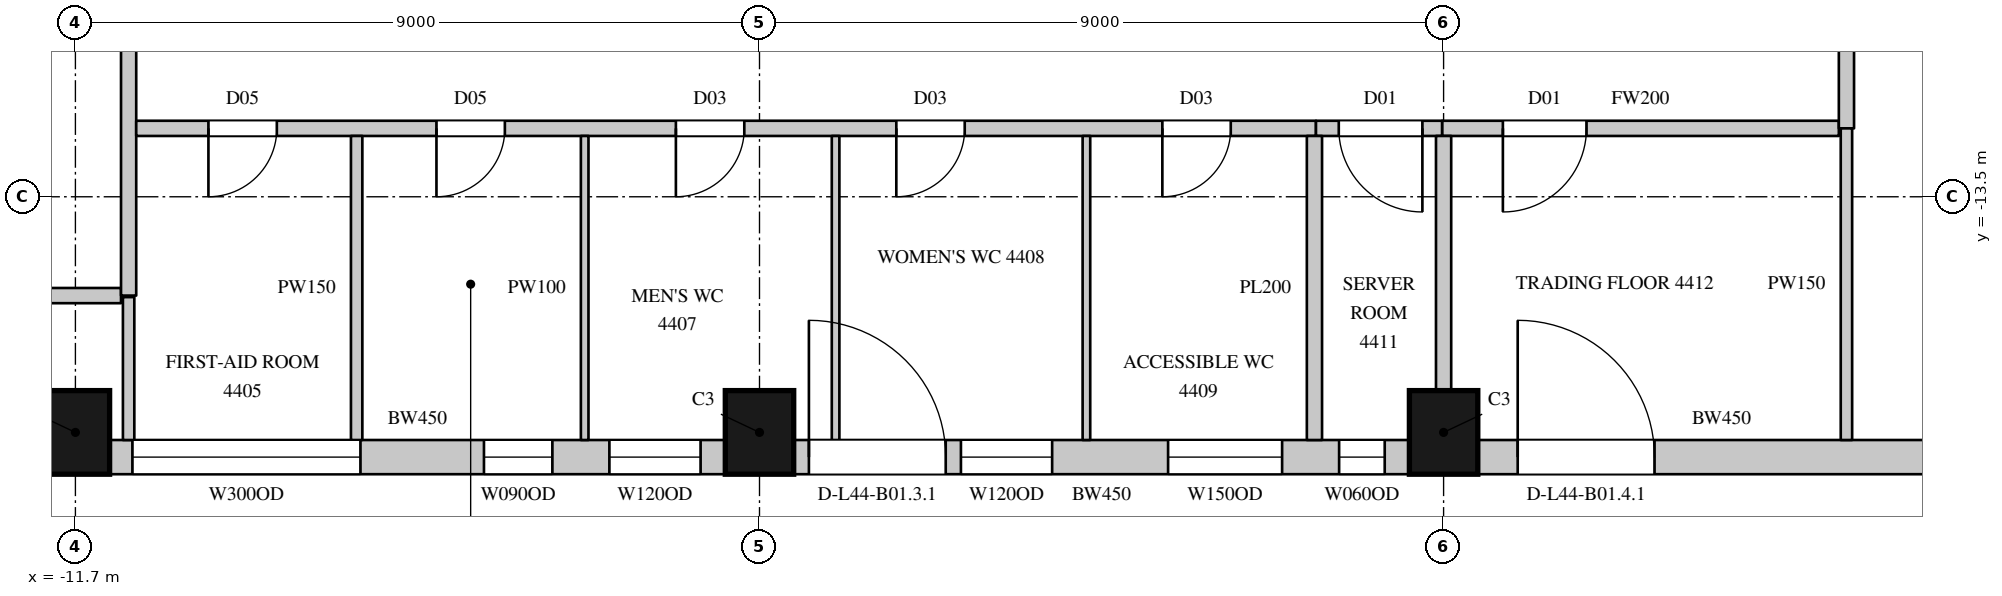
"""IFC4 building model, lengths in metres.
Left out: names, types, materials, properties, quantities, classifications, styles, units other than length and angle.
Written with IfcOpenShell. Run it as: python <this file> out.ifc"""

import sys

from ifc_helpers import new_model, si_unit, direction, frame, frame_2d, origin, origin_2d, place, context, subcontext, project, spatial, rectangle, extrude, element, fill, save


model = new_model("IFC4")
c1 = context("Model", 3, precision=1e-05, world=origin(), true_north=direction((0.0, 1.0)))
c2 = subcontext(c1, "Body", "Model", "MODEL_VIEW")
j1 = project(units=[si_unit("LENGTHUNIT", "METRE"), si_unit("PLANEANGLEUNIT", "RADIAN")], contexts=[c1])
p1 = place(None, origin())
s1 = spatial("IfcSite", under=j1, at=p1, CompositionType="ELEMENT")
p2 = place(p1, origin())
s2 = spatial("IfcBuilding", under=s1, at=p2, CompositionType="ELEMENT")
p3 = place(p2, frame((0.0, 0.0, 201.5)))
s3 = spatial("IfcBuildingStorey", under=s2, at=p3, CompositionType="ELEMENT", Elevation=201.5)
for number, where, z_axis, x_axis in (
    (1, (-11.7, -16.6, 0.0), (0.0, 0.0, 1.0), (1.0, 0.0, 0.0)),
    (2, (-2.7, -16.6, 0.0), (0.0, 0.0, 1.0), (1.0, 0.0, 0.0)),
    (3, (6.3, -16.6, 0.0), (0.0, 0.0, 1.0), (1.0, 0.0, 0.0)),
):
    element("IfcColumn", number, at=place(p3, frame(where, z_axis=z_axis, x_axis=x_axis)), inside=s3, PredefinedType="COLUMN", context=c2, shape_type="SweptSolid", body=[
        extrude(rectangle(XDim=0.9, YDim=1.1, at=origin_2d()), origin(), (0.0, 0.0, 1.0), 4.1),
    ])
p4 = place(p3, frame((-11.25, -16.925, 0.0), z_axis=(0.0, 0.0, 1.0), x_axis=(1.0, 0.0, 0.0)))
e4 = element("IfcWall", 4, at=p4, inside=s3, PredefinedType="SOLIDWALL", context=c2, shape_type="SweptSolid", body=[
    extrude(rectangle(XDim=8.1, YDim=0.45, at=frame_2d((4.05, 0.0))), origin(), (0.0, 0.0, 1.0), 3.8),
])
p5 = place(p4, frame((0.3, 0.0, 1.05)))
e5 = element("IfcOpeningElement", 5, at=p5, cuts=e4, PredefinedType="OPENING", context=c2, shape_type="SweptSolid", body=[
    extrude(rectangle(XDim=3.0, YDim=2.4, at=frame_2d((1.5, 1.2))), frame((0.0, 0.235, 0.0), z_axis=(0.0, -1.0, 0.0), x_axis=(1.0, 0.0, 0.0)), (0.0, 0.0, 1.0), 0.47),
])
p6 = place(p4, frame((4.925, 0.0, 1.05)))
e6 = element("IfcOpeningElement", 6, at=p6, cuts=e4, PredefinedType="OPENING", context=c2, shape_type="SweptSolid", body=[
    extrude(rectangle(XDim=0.9, YDim=2.4, at=frame_2d((0.45, 1.2))), frame((0.0, 0.235, 0.0), z_axis=(0.0, -1.0, 0.0), x_axis=(1.0, 0.0, 0.0)), (0.0, 0.0, 1.0), 0.47),
])
p7 = place(p4, frame((6.575, 0.0, 1.05)))
e7 = element("IfcOpeningElement", 7, at=p7, cuts=e4, PredefinedType="OPENING", context=c2, shape_type="SweptSolid", body=[
    extrude(rectangle(XDim=1.2, YDim=2.4, at=frame_2d((0.6, 1.2))), frame((0.0, 0.235, 0.0), z_axis=(0.0, -1.0, 0.0), x_axis=(1.0, 0.0, 0.0)), (0.0, 0.0, 1.0), 0.47),
])
p8 = place(p3, frame((-2.25, -16.925, 0.0), z_axis=(0.0, 0.0, 1.0), x_axis=(1.0, 0.0, 0.0)))
e8 = element("IfcWall", 8, at=p8, inside=s3, PredefinedType="SOLIDWALL", context=c2, shape_type="SweptSolid", body=[
    extrude(rectangle(XDim=8.1, YDim=0.45, at=frame_2d((4.05, 0.0))), origin(), (0.0, 0.0, 1.0), 3.8),
])
p9 = place(p8, frame((0.2, 0.0, 0.0)))
e9 = element("IfcOpeningElement", 9, at=p9, cuts=e8, PredefinedType="OPENING", context=c2, shape_type="SweptSolid", body=[
    extrude(rectangle(XDim=1.8, YDim=2.4, at=frame_2d((0.9, 1.2))), frame((0.0, 0.235, 0.0), z_axis=(0.0, -1.0, 0.0), x_axis=(1.0, 0.0, 0.0)), (0.0, 0.0, 1.0), 0.47),
])
p10 = place(p8, frame((2.2, 0.0, 1.05)))
e10 = element("IfcOpeningElement", 10, at=p10, cuts=e8, PredefinedType="OPENING", context=c2, shape_type="SweptSolid", body=[
    extrude(rectangle(XDim=1.2, YDim=2.4, at=frame_2d((0.6, 1.2))), frame((0.0, 0.235, 0.0), z_axis=(0.0, -1.0, 0.0), x_axis=(1.0, 0.0, 0.0)), (0.0, 0.0, 1.0), 0.47),
])
p11 = place(p8, frame((4.926, 0.0, 1.05)))
e11 = element("IfcOpeningElement", 11, at=p11, cuts=e8, PredefinedType="OPENING", context=c2, shape_type="SweptSolid", body=[
    extrude(rectangle(XDim=1.5, YDim=2.4, at=frame_2d((0.75, 1.2))), frame((0.0, 0.235, 0.0), z_axis=(0.0, -1.0, 0.0), x_axis=(1.0, 0.0, 0.0)), (0.0, 0.0, 1.0), 0.47),
])
p12 = place(p8, frame((7.176, 0.0, 1.05)))
e12 = element("IfcOpeningElement", 12, at=p12, cuts=e8, PredefinedType="OPENING", context=c2, shape_type="SweptSolid", body=[
    extrude(rectangle(XDim=0.6, YDim=2.4, at=frame_2d((0.3, 1.2))), frame((0.0, 0.235, 0.0), z_axis=(0.0, -1.0, 0.0), x_axis=(1.0, 0.0, 0.0)), (0.0, 0.0, 1.0), 0.47),
])
p13 = place(p3, frame((6.75, -16.925, 0.0), z_axis=(0.0, 0.0, 1.0), x_axis=(1.0, 0.0, 0.0)))
e13 = element("IfcWall", 13, at=p13, inside=s3, PredefinedType="SOLIDWALL", context=c2, shape_type="SweptSolid", body=[
    extrude(rectangle(XDim=6.414, YDim=0.45, at=frame_2d((3.207, 0.0))), origin(), (0.0, 0.0, 1.0), 3.8),
])
p14 = place(p13, frame((0.525, 0.0, 0.0)))
e14 = element("IfcOpeningElement", 14, at=p14, cuts=e13, PredefinedType="OPENING", context=c2, shape_type="SweptSolid", body=[
    extrude(rectangle(XDim=1.8, YDim=2.4, at=frame_2d((0.9, 1.2))), frame((0.0, 0.235, 0.0), z_axis=(0.0, -1.0, 0.0), x_axis=(1.0, 0.0, 0.0)), (0.0, 0.0, 1.0), 0.47),
])
p15 = place(p3, frame((-13.97, -14.8, 0.0), z_axis=(0.0, 0.0, 1.0), x_axis=(1.0, 0.0, 0.0)))
e15 = element("IfcWall", 15, at=p15, inside=s3, PredefinedType="PARTITIONING", context=c2, shape_type="SweptSolid", body=[
    extrude(rectangle(XDim=2.87, YDim=0.2, at=frame_2d((1.435, 0.0))), origin(), (0.0, 0.0, 1.0), 3.8),
])
p16 = place(p3, frame((-11.0, -14.8, 0.0), z_axis=(0.0, 0.0, 1.0), x_axis=(0.0, 1.0, 0.0)))
e16 = element("IfcWall", 16, at=p16, inside=s3, PredefinedType="PARTITIONING", context=c2, shape_type="SweptSolid", body=[
    extrude(rectangle(XDim=29.6, YDim=0.2, at=frame_2d((14.8, 0.0))), origin(), (0.0, 0.0, 1.0), 3.8),
])
p17 = place(p16, frame((14.05, 0.0, 0.0)))
e17 = element("IfcOpeningElement", 17, at=p17, cuts=e16, PredefinedType="OPENING", context=c2, shape_type="SweptSolid", body=[
    extrude(rectangle(XDim=1.5, YDim=2.4, at=frame_2d((0.75, 1.2))), frame((0.0, 0.11, 0.0), z_axis=(0.0, -1.0, 0.0), x_axis=(1.0, 0.0, 0.0)), (0.0, 0.0, 1.0), 0.22),
])
p18 = place(p3, frame((-10.9, -12.6, 0.0), z_axis=(0.0, 0.0, 1.0), x_axis=(1.0, 0.0, 0.0)))
e18 = element("IfcWall", 18, at=p18, inside=s3, PredefinedType="PARTITIONING", context=c2, shape_type="SweptSolid", body=[
    extrude(rectangle(XDim=15.521, YDim=0.2, at=frame_2d((7.76, 0.0))), origin(), (0.0, 0.0, 1.0), 3.8),
])
p19 = place(p18, frame((0.95, 0.0, 0.0)))
e19 = element("IfcOpeningElement", 19, at=p19, cuts=e18, PredefinedType="OPENING", context=c2, shape_type="SweptSolid", body=[
    extrude(rectangle(XDim=0.9, YDim=2.2, at=frame_2d((0.45, 1.1))), frame((0.0, 0.11, 0.0), z_axis=(0.0, -1.0, 0.0), x_axis=(1.0, 0.0, 0.0)), (0.0, 0.0, 1.0), 0.22),
])
p20 = place(p18, frame((3.95, 0.0, 0.0)))
e20 = element("IfcOpeningElement", 20, at=p20, cuts=e18, PredefinedType="OPENING", context=c2, shape_type="SweptSolid", body=[
    extrude(rectangle(XDim=0.9, YDim=2.2, at=frame_2d((0.45, 1.1))), frame((0.0, 0.11, 0.0), z_axis=(0.0, -1.0, 0.0), x_axis=(1.0, 0.0, 0.0)), (0.0, 0.0, 1.0), 0.22),
])
p21 = place(p18, frame((7.1, 0.0, 0.0)))
e21 = element("IfcOpeningElement", 21, at=p21, cuts=e18, PredefinedType="OPENING", context=c2, shape_type="SweptSolid", body=[
    extrude(rectangle(XDim=0.9, YDim=2.2, at=frame_2d((0.45, 1.1))), frame((0.0, 0.11, 0.0), z_axis=(0.0, -1.0, 0.0), x_axis=(1.0, 0.0, 0.0)), (0.0, 0.0, 1.0), 0.22),
])
p22 = place(p18, frame((10.0, 0.0, 0.0)))
e22 = element("IfcOpeningElement", 22, at=p22, cuts=e18, PredefinedType="OPENING", context=c2, shape_type="SweptSolid", body=[
    extrude(rectangle(XDim=0.9, YDim=2.2, at=frame_2d((0.45, 1.1))), frame((0.0, 0.11, 0.0), z_axis=(0.0, -1.0, 0.0), x_axis=(1.0, 0.0, 0.0)), (0.0, 0.0, 1.0), 0.22),
])
p23 = place(p18, frame((13.5, 0.0, 0.0)))
e23 = element("IfcOpeningElement", 23, at=p23, cuts=e18, PredefinedType="OPENING", context=c2, shape_type="SweptSolid", body=[
    extrude(rectangle(XDim=0.9, YDim=2.2, at=frame_2d((0.45, 1.1))), frame((0.0, 0.11, 0.0), z_axis=(0.0, -1.0, 0.0), x_axis=(1.0, 0.0, 0.0)), (0.0, 0.0, 1.0), 0.22),
])
p24 = place(p3, frame((6.28, -12.6, 0.0), z_axis=(0.0, 0.0, 1.0), x_axis=(1.0, 0.0, 0.0)))
e24 = element("IfcWall", 24, at=p24, inside=s3, PredefinedType="PARTITIONING", context=c2, shape_type="SweptSolid", body=[
    extrude(rectangle(XDim=5.22, YDim=0.2, at=frame_2d((2.61, 0.0))), origin(), (0.0, 0.0, 1.0), 3.8),
])
p25 = place(p24, frame((0.8, 0.0, 0.0)))
e25 = element("IfcOpeningElement", 25, at=p25, cuts=e24, PredefinedType="OPENING", context=c2, shape_type="SweptSolid", body=[
    extrude(rectangle(XDim=1.1, YDim=2.4, at=frame_2d((0.55, 1.2))), frame((0.0, 0.11, 0.0), z_axis=(0.0, -1.0, 0.0), x_axis=(1.0, 0.0, 0.0)), (0.0, 0.0, 1.0), 0.22),
])
p26 = place(p3, frame((11.6, -12.6, 0.0), z_axis=(0.0, 0.0, 1.0), x_axis=(0.0, 1.0, 0.0)))
e26 = element("IfcWall", 26, at=p26, inside=s3, PredefinedType="PARTITIONING", context=c2, shape_type="SweptSolid", body=[
    extrude(rectangle(XDim=25.1, YDim=0.2, at=frame_2d((12.55, 0.0))), origin(), (0.0, 0.0, 1.0), 3.8),
])
p27 = place(p26, frame((10.45, 0.0, 0.0)))
e27 = element("IfcOpeningElement", 27, at=p27, cuts=e26, PredefinedType="OPENING", context=c2, shape_type="SweptSolid", body=[
    extrude(rectangle(XDim=1.5, YDim=2.4, at=frame_2d((0.75, 1.2))), frame((0.0, 0.11, 0.0), z_axis=(0.0, -1.0, 0.0), x_axis=(1.0, 0.0, 0.0)), (0.0, 0.0, 1.0), 0.22),
])
p28 = place(p26, frame((3.45, 0.0, 0.0)))
e28 = element("IfcOpeningElement", 28, at=p28, cuts=e26, PredefinedType="OPENING", context=c2, shape_type="SweptSolid", body=[
    extrude(rectangle(XDim=1.1, YDim=2.4, at=frame_2d((0.55, 1.2))), frame((0.0, 0.11, 0.0), z_axis=(0.0, -1.0, 0.0), x_axis=(1.0, 0.0, 0.0)), (0.0, 0.0, 1.0), 0.22),
])
p29 = place(p3, frame((-11.0, -16.7, 0.0), z_axis=(0.0, 0.0, 1.0), x_axis=(0.0, 1.0, 0.0)))
e29 = element("IfcWall", 29, at=p29, inside=s3, PredefinedType="PARTITIONING", context=c2, shape_type="SweptSolid", body=[
    extrude(rectangle(XDim=1.88, YDim=0.15, at=frame_2d((0.94, 0.0))), origin(), (0.0, 0.0, 1.0), 3.8),
])
p30 = place(p3, frame((-8.0, -16.7, 0.0), z_axis=(0.0, 0.0, 1.0), x_axis=(0.0, 1.0, 0.0)))
e30 = element("IfcWall", 30, at=p30, inside=s3, PredefinedType="PARTITIONING", context=c2, shape_type="SweptSolid", body=[
    extrude(rectangle(XDim=4.0, YDim=0.15, at=frame_2d((2.0, 0.0))), origin(), (0.0, 0.0, 1.0), 3.8),
])
p31 = place(p3, frame((11.6, -16.7, 0.0), z_axis=(0.0, 0.0, 1.0), x_axis=(0.0, 1.0, 0.0)))
e31 = element("IfcWall", 31, at=p31, inside=s3, PredefinedType="PARTITIONING", context=c2, shape_type="SweptSolid", body=[
    extrude(rectangle(XDim=4.1, YDim=0.15, at=frame_2d((2.05, 0.0))), origin(), (0.0, 0.0, 1.0), 3.8),
])
p32 = place(p3, frame((4.621, -12.6, 0.0), z_axis=(0.0, 0.0, 1.0), x_axis=(1.0, 0.0, 0.0)))
e32 = element("IfcWall", 32, at=p32, inside=s3, PredefinedType="PARTITIONING", context=c2, shape_type="SweptSolid", body=[
    extrude(rectangle(XDim=1.659, YDim=0.2, at=frame_2d((0.83, 0.0))), origin(), (0.0, 0.0, 1.0), 3.8),
])
p33 = place(p32, frame((0.3, 0.0, 0.0)))
e33 = element("IfcOpeningElement", 33, at=p33, cuts=e32, PredefinedType="OPENING", context=c2, shape_type="SweptSolid", body=[
    extrude(rectangle(XDim=1.1, YDim=2.4, at=frame_2d((0.55, 1.2))), frame((0.0, 0.11, 0.0), z_axis=(0.0, -1.0, 0.0), x_axis=(1.0, 0.0, 0.0)), (0.0, 0.0, 1.0), 0.22),
])
p34 = place(p3, frame((4.601, -16.7, 0.0), z_axis=(0.0, 0.0, 1.0), x_axis=(0.0, 1.0, 0.0)))
e34 = element("IfcWall", 34, at=p34, inside=s3, PredefinedType="PARTITIONING", context=c2, shape_type="SweptSolid", body=[
    extrude(rectangle(XDim=4.0, YDim=0.2, at=frame_2d((2.0, 0.0))), origin(), (0.0, 0.0, 1.0), 3.8),
])
p35 = place(p3, frame((6.3, -16.05, 0.0), z_axis=(0.0, 0.0, 1.0), x_axis=(0.0, 1.0, 0.0)))
e35 = element("IfcWall", 35, at=p35, inside=s3, PredefinedType="PARTITIONING", context=c2, shape_type="SweptSolid", body=[
    extrude(rectangle(XDim=3.35, YDim=0.2, at=frame_2d((1.675, 0.0))), origin(), (0.0, 0.0, 1.0), 3.25),
])
for number, where, z_axis, x_axis in (
    (36, (-5.0, -16.7, 0.0), (0.0, 0.0, 1.0), (0.0, 1.0, 0.0)),
    (37, (-1.699, -16.7, 0.0), (0.0, 0.0, 1.0), (0.0, 1.0, 0.0)),
):
    element("IfcWall", number, at=place(p3, frame(where, z_axis=z_axis, x_axis=x_axis)), inside=s3, PredefinedType="PARTITIONING", context=c2, shape_type="SweptSolid", body=[
        extrude(rectangle(XDim=4.0, YDim=0.1, at=frame_2d((2.0, 0.0))), origin(), (0.0, 0.0, 1.0), 3.8),
    ])
p36 = place(p3, frame((1.601, -16.7, 0.0), z_axis=(0.0, 0.0, 1.0), x_axis=(0.0, 1.0, 0.0)))
e38 = element("IfcWall", 38, at=p36, inside=s3, PredefinedType="PARTITIONING", context=c2, shape_type="SweptSolid", body=[
    extrude(rectangle(XDim=4.0, YDim=0.1, at=frame_2d((2.0, 0.0))), origin(), (0.0, 0.0, 1.0), 3.15),
])
p37 = place(p5, origin())
e39 = element("IfcWindow", 39, at=p37, inside=s3, PartitioningType="SINGLE_PANEL", PredefinedType="WINDOW", context=c2, shape_type="SweptSolid", body=[
    extrude(rectangle(XDim=3.0, YDim=2.4, at=frame_2d((1.5, 1.2))), frame((0.0, 0.135, 0.0), z_axis=(0.0, -1.0, 0.0), x_axis=(1.0, 0.0, 0.0)), (0.0, 0.0, 1.0), 0.06),
])
fill(e5, e39)
p38 = place(p9, origin())
e40 = element("IfcDoor", 40, at=p38, inside=s3, OperationType="SLIDING_TO_LEFT", PredefinedType="DOOR", context=c2, shape_type="SweptSolid", body=[
    extrude(rectangle(XDim=1.8, YDim=2.4, at=frame_2d((0.9, 1.2))), frame((0.0, 0.13, 0.0), z_axis=(0.0, -1.0, 0.0), x_axis=(1.0, 0.0, 0.0)), (0.0, 0.0, 1.0), 0.05),
])
fill(e9, e40)
p39 = place(p10, origin())
e41 = element("IfcWindow", 41, at=p39, inside=s3, PartitioningType="SINGLE_PANEL", PredefinedType="WINDOW", context=c2, shape_type="SweptSolid", body=[
    extrude(rectangle(XDim=1.2, YDim=2.4, at=frame_2d((0.6, 1.2))), frame((0.0, 0.135, 0.0), z_axis=(0.0, -1.0, 0.0), x_axis=(1.0, 0.0, 0.0)), (0.0, 0.0, 1.0), 0.06),
])
fill(e10, e41)
p40 = place(p14, origin())
e42 = element("IfcDoor", 42, at=p40, inside=s3, OperationType="SLIDING_TO_LEFT", PredefinedType="DOOR", context=c2, shape_type="SweptSolid", body=[
    extrude(rectangle(XDim=1.8, YDim=2.4, at=frame_2d((0.9, 1.2))), frame((0.0, 0.13, 0.0), z_axis=(0.0, -1.0, 0.0), x_axis=(1.0, 0.0, 0.0)), (0.0, 0.0, 1.0), 0.05),
])
fill(e14, e42)
p41 = place(p19, origin())
e43 = element("IfcDoor", 43, at=p41, inside=s3, OperationType="SINGLE_SWING_RIGHT", PredefinedType="DOOR", context=c2, shape_type="SweptSolid", body=[
    extrude(rectangle(XDim=0.9, YDim=2.2, at=frame_2d((0.45, 1.1))), frame((0.0, 0.025, 0.0), z_axis=(0.0, -1.0, 0.0), x_axis=(1.0, 0.0, 0.0)), (0.0, 0.0, 1.0), 0.05),
])
fill(e19, e43)
p42 = place(p20, origin())
e44 = element("IfcDoor", 44, at=p42, inside=s3, OperationType="SINGLE_SWING_RIGHT", PredefinedType="DOOR", context=c2, shape_type="SweptSolid", body=[
    extrude(rectangle(XDim=0.9, YDim=2.2, at=frame_2d((0.45, 1.1))), frame((0.0, 0.025, 0.0), z_axis=(0.0, -1.0, 0.0), x_axis=(1.0, 0.0, 0.0)), (0.0, 0.0, 1.0), 0.05),
])
fill(e20, e44)
p43 = place(p21, origin())
e45 = element("IfcDoor", 45, at=p43, inside=s3, OperationType="SINGLE_SWING_RIGHT", PredefinedType="DOOR", context=c2, shape_type="SweptSolid", body=[
    extrude(rectangle(XDim=0.9, YDim=2.2, at=frame_2d((0.45, 1.1))), frame((0.0, 0.025, 0.0), z_axis=(0.0, -1.0, 0.0), x_axis=(1.0, 0.0, 0.0)), (0.0, 0.0, 1.0), 0.05),
])
fill(e21, e45)
p44 = place(p22, origin())
e46 = element("IfcDoor", 46, at=p44, inside=s3, OperationType="SINGLE_SWING_RIGHT", PredefinedType="DOOR", context=c2, shape_type="SweptSolid", body=[
    extrude(rectangle(XDim=0.9, YDim=2.2, at=frame_2d((0.45, 1.1))), frame((0.0, 0.025, 0.0), z_axis=(0.0, -1.0, 0.0), x_axis=(1.0, 0.0, 0.0)), (0.0, 0.0, 1.0), 0.05),
])
fill(e22, e46)
p45 = place(p23, origin())
e47 = element("IfcDoor", 47, at=p45, inside=s3, OperationType="SINGLE_SWING_RIGHT", PredefinedType="DOOR", context=c2, shape_type="SweptSolid", body=[
    extrude(rectangle(XDim=0.9, YDim=2.2, at=frame_2d((0.45, 1.1))), frame((0.0, 0.025, 0.0), z_axis=(0.0, -1.0, 0.0), x_axis=(1.0, 0.0, 0.0)), (0.0, 0.0, 1.0), 0.05),
])
fill(e23, e47)
p46 = place(p33, origin())
e48 = element("IfcDoor", 48, at=p46, inside=s3, OperationType="SINGLE_SWING_LEFT", PredefinedType="DOOR", context=c2, shape_type="SweptSolid", body=[
    extrude(rectangle(XDim=1.1, YDim=2.4, at=frame_2d((0.55, 1.2))), frame((0.0, 0.025, 0.0), z_axis=(0.0, -1.0, 0.0), x_axis=(1.0, 0.0, 0.0)), (0.0, 0.0, 1.0), 0.05),
])
fill(e33, e48)
p47 = place(p25, origin())
e49 = element("IfcDoor", 49, at=p47, inside=s3, OperationType="SINGLE_SWING_RIGHT", PredefinedType="DOOR", context=c2, shape_type="SweptSolid", body=[
    extrude(rectangle(XDim=1.1, YDim=2.4, at=frame_2d((0.55, 1.2))), frame((0.0, 0.025, 0.0), z_axis=(0.0, -1.0, 0.0), x_axis=(1.0, 0.0, 0.0)), (0.0, 0.0, 1.0), 0.05),
])
fill(e25, e49)
p48 = place(p6, origin())
e50 = element("IfcWindow", 50, at=p48, inside=s3, PartitioningType="SINGLE_PANEL", PredefinedType="WINDOW", context=c2, shape_type="SweptSolid", body=[
    extrude(rectangle(XDim=0.9, YDim=2.4, at=frame_2d((0.45, 1.2))), frame((0.0, 0.135, 0.0), z_axis=(0.0, -1.0, 0.0), x_axis=(1.0, 0.0, 0.0)), (0.0, 0.0, 1.0), 0.06),
])
fill(e6, e50)
p49 = place(p7, origin())
e51 = element("IfcWindow", 51, at=p49, inside=s3, PartitioningType="SINGLE_PANEL", PredefinedType="WINDOW", context=c2, shape_type="SweptSolid", body=[
    extrude(rectangle(XDim=1.2, YDim=2.4, at=frame_2d((0.6, 1.2))), frame((0.0, 0.135, 0.0), z_axis=(0.0, -1.0, 0.0), x_axis=(1.0, 0.0, 0.0)), (0.0, 0.0, 1.0), 0.06),
])
fill(e7, e51)
p50 = place(p11, origin())
e52 = element("IfcWindow", 52, at=p50, inside=s3, PartitioningType="SINGLE_PANEL", PredefinedType="WINDOW", context=c2, shape_type="SweptSolid", body=[
    extrude(rectangle(XDim=1.5, YDim=2.4, at=frame_2d((0.75, 1.2))), frame((0.0, 0.135, 0.0), z_axis=(0.0, -1.0, 0.0), x_axis=(1.0, 0.0, 0.0)), (0.0, 0.0, 1.0), 0.06),
])
fill(e11, e52)
p51 = place(p12, origin())
e53 = element("IfcWindow", 53, at=p51, inside=s3, PartitioningType="SINGLE_PANEL", PredefinedType="WINDOW", context=c2, shape_type="SweptSolid", body=[
    extrude(rectangle(XDim=0.6, YDim=2.4, at=frame_2d((0.3, 1.2))), frame((0.0, 0.135, 0.0), z_axis=(0.0, -1.0, 0.0), x_axis=(1.0, 0.0, 0.0)), (0.0, 0.0, 1.0), 0.06),
])
fill(e12, e53)
save(model, sys.argv[1])
